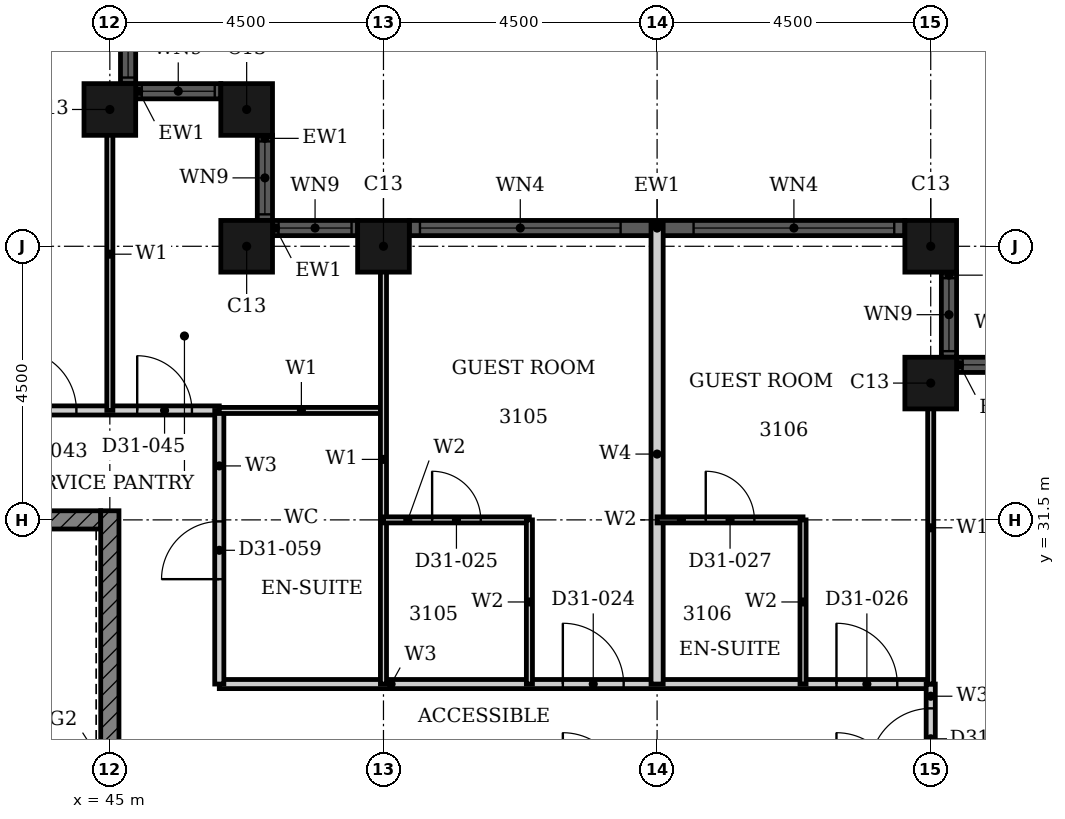
"""IFC4 building model, lengths in metres.
Left out: names, types, materials, properties, quantities, classifications, styles, units other than length and angle.
Written with IfcOpenShell. Run it as: python <this file> out.ifc"""

import sys

from ifc_helpers import new_model, si_unit, direction, frame, frame_2d, origin, origin_2d, place, context, subcontext, project, spatial, rectangle, hollow_rectangle, extrude, element, fill, save


model = new_model("IFC4")
c1 = context("Model", 3, precision=1e-05, world=origin(), true_north=direction((0.0, 1.0)))
c2 = subcontext(c1, "Body", "Model", "MODEL_VIEW")
j1 = project(units=[si_unit("LENGTHUNIT", "METRE"), si_unit("PLANEANGLEUNIT", "RADIAN")], contexts=[c1])
p1 = place(None, origin())
s1 = spatial("IfcSite", under=j1, at=p1, CompositionType="ELEMENT")
p2 = place(p1, origin())
s2 = spatial("IfcBuilding", under=s1, at=p2, CompositionType="ELEMENT")
p3 = place(p2, frame((0.0, 0.0, 126.0)))
s3 = spatial("IfcBuildingStorey", under=s2, at=p3, CompositionType="ELEMENT", Elevation=126.0)
for number, where, z_axis, x_axis in (
    (1, (58.5, 33.75, 0.0), (0.0, 0.0, 1.0), (1.0, 0.0, 0.0)),
    (2, (58.5, 36.0, 0.0), (0.0, 0.0, 1.0), (1.0, 0.0, 0.0)),
    (3, (49.5, 36.0, 0.0), (0.0, 0.0, 1.0), (1.0, 0.0, 0.0)),
    (4, (47.25, 36.0, 0.0), (0.0, 0.0, 1.0), (1.0, 0.0, 0.0)),
    (5, (47.25, 38.25, 0.0), (0.0, 0.0, 1.0), (1.0, 0.0, 0.0)),
    (6, (45.0, 38.25, 0.0), (0.0, 0.0, 1.0), (1.0, 0.0, 0.0)),
):
    element("IfcColumn", number, at=place(p3, frame(where, z_axis=z_axis, x_axis=x_axis)), inside=s3, PredefinedType="COLUMN", context=c2, shape_type="SweptSolid", body=[
        extrude(hollow_rectangle(XDim=0.85, YDim=0.85, WallThickness=0.026, at=origin_2d()), origin(), (0.0, 0.0, 1.0), 3.6),
    ])
p4 = place(p3, frame((60.325, 34.05, 0.0), z_axis=(0.0, 0.0, 1.0), x_axis=(-1.0, 0.0, 0.0)))
e7 = element("IfcWall", 7, at=p4, inside=s3, PredefinedType="SOLIDWALL", context=c2, shape_type="SweptSolid", body=[
    extrude(rectangle(XDim=1.4, YDim=0.25, at=frame_2d((0.7, 0.0))), origin(), (0.0, 0.0, 1.0), 3.6),
])
p5 = place(p4, frame((0.1, 0.0, 0.9)))
e8 = element("IfcOpeningElement", 8, at=p5, cuts=e7, PredefinedType="OPENING", context=c2, shape_type="SweptSolid", body=[
    extrude(rectangle(XDim=1.2, YDim=2.08, at=frame_2d((0.6, 1.04))), frame((0.0, 0.135, 0.0), z_axis=(0.0, -1.0, 0.0), x_axis=(1.0, 0.0, 0.0)), (0.0, 0.0, 1.0), 0.27),
])
p6 = place(p3, frame((58.8, 34.175, 0.0), z_axis=(0.0, 0.0, 1.0), x_axis=(0.0, 1.0, 0.0)))
e9 = element("IfcWall", 9, at=p6, inside=s3, PredefinedType="SOLIDWALL", context=c2, shape_type="SweptSolid", body=[
    extrude(rectangle(XDim=1.4, YDim=0.25, at=frame_2d((0.7, 0.0))), origin(), (0.0, 0.0, 1.0), 3.6),
])
p7 = place(p6, frame((0.1, 0.0, 0.9)))
e10 = element("IfcOpeningElement", 10, at=p7, cuts=e9, PredefinedType="OPENING", context=c2, shape_type="SweptSolid", body=[
    extrude(rectangle(XDim=1.2, YDim=2.08, at=frame_2d((0.6, 1.04))), frame((0.0, 0.135, 0.0), z_axis=(0.0, -1.0, 0.0), x_axis=(1.0, 0.0, 0.0)), (0.0, 0.0, 1.0), 0.27),
])
p8 = place(p3, frame((58.075, 36.3, 0.0), z_axis=(0.0, 0.0, 1.0), x_axis=(-1.0, 0.0, 0.0)))
e11 = element("IfcWall", 11, at=p8, inside=s3, PredefinedType="SOLIDWALL", context=c2, shape_type="SweptSolid", body=[
    extrude(rectangle(XDim=8.15, YDim=0.25, at=frame_2d((4.075, 0.0))), origin(), (0.0, 0.0, 1.0), 3.6),
])
p9 = place(p8, frame((0.175, 0.0, 0.9)))
e12 = element("IfcOpeningElement", 12, at=p9, cuts=e11, PredefinedType="OPENING", context=c2, shape_type="SweptSolid", body=[
    extrude(rectangle(XDim=3.3, YDim=2.08, at=frame_2d((1.65, 1.04))), frame((0.0, 0.135, 0.0), z_axis=(0.0, -1.0, 0.0), x_axis=(1.0, 0.0, 0.0)), (0.0, 0.0, 1.0), 0.27),
])
p10 = place(p8, frame((4.675, 0.0, 0.9)))
e13 = element("IfcOpeningElement", 13, at=p10, cuts=e11, PredefinedType="OPENING", context=c2, shape_type="SweptSolid", body=[
    extrude(rectangle(XDim=3.3, YDim=2.08, at=frame_2d((1.65, 1.04))), frame((0.0, 0.135, 0.0), z_axis=(0.0, -1.0, 0.0), x_axis=(1.0, 0.0, 0.0)), (0.0, 0.0, 1.0), 0.27),
])
p11 = place(p3, frame((49.075, 36.3, 0.0), z_axis=(0.0, 0.0, 1.0), x_axis=(-1.0, 0.0, 0.0)))
e14 = element("IfcWall", 14, at=p11, inside=s3, PredefinedType="SOLIDWALL", context=c2, shape_type="SweptSolid", body=[
    extrude(rectangle(XDim=1.4, YDim=0.25, at=frame_2d((0.7, 0.0))), origin(), (0.0, 0.0, 1.0), 3.6),
])
p12 = place(p11, frame((0.1, 0.0, 0.9)))
e15 = element("IfcOpeningElement", 15, at=p12, cuts=e14, PredefinedType="OPENING", context=c2, shape_type="SweptSolid", body=[
    extrude(rectangle(XDim=1.2, YDim=2.08, at=frame_2d((0.6, 1.04))), frame((0.0, 0.135, 0.0), z_axis=(0.0, -1.0, 0.0), x_axis=(1.0, 0.0, 0.0)), (0.0, 0.0, 1.0), 0.27),
])
p13 = place(p3, frame((47.55, 36.425, 0.0), z_axis=(0.0, 0.0, 1.0), x_axis=(0.0, 1.0, 0.0)))
e16 = element("IfcWall", 16, at=p13, inside=s3, PredefinedType="SOLIDWALL", context=c2, shape_type="SweptSolid", body=[
    extrude(rectangle(XDim=1.4, YDim=0.25, at=frame_2d((0.7, 0.0))), origin(), (0.0, 0.0, 1.0), 3.6),
])
p14 = place(p13, frame((0.1, 0.0, 0.9)))
e17 = element("IfcOpeningElement", 17, at=p14, cuts=e16, PredefinedType="OPENING", context=c2, shape_type="SweptSolid", body=[
    extrude(rectangle(XDim=1.2, YDim=2.08, at=frame_2d((0.6, 1.04))), frame((0.0, 0.135, 0.0), z_axis=(0.0, -1.0, 0.0), x_axis=(1.0, 0.0, 0.0)), (0.0, 0.0, 1.0), 0.27),
])
p15 = place(p3, frame((46.825, 38.55, 0.0), z_axis=(0.0, 0.0, 1.0), x_axis=(-1.0, 0.0, 0.0)))
e18 = element("IfcWall", 18, at=p15, inside=s3, PredefinedType="SOLIDWALL", context=c2, shape_type="SweptSolid", body=[
    extrude(rectangle(XDim=1.4, YDim=0.25, at=frame_2d((0.7, 0.0))), origin(), (0.0, 0.0, 1.0), 3.6),
])
p16 = place(p15, frame((0.1, 0.0, 0.9)))
e19 = element("IfcOpeningElement", 19, at=p16, cuts=e18, PredefinedType="OPENING", context=c2, shape_type="SweptSolid", body=[
    extrude(rectangle(XDim=1.2, YDim=2.08, at=frame_2d((0.6, 1.04))), frame((0.0, 0.135, 0.0), z_axis=(0.0, -1.0, 0.0), x_axis=(1.0, 0.0, 0.0)), (0.0, 0.0, 1.0), 0.27),
])
p17 = place(p3, frame((45.3, 38.675, 0.0), z_axis=(0.0, 0.0, 1.0), x_axis=(0.0, 1.0, 0.0)))
e20 = element("IfcWall", 20, at=p17, inside=s3, PredefinedType="SOLIDWALL", context=c2, shape_type="SweptSolid", body=[
    extrude(rectangle(XDim=1.4, YDim=0.25, at=frame_2d((0.7, 0.0))), origin(), (0.0, 0.0, 1.0), 3.6),
])
p18 = place(p17, frame((0.1, 0.0, 0.9)))
e21 = element("IfcOpeningElement", 21, at=p18, cuts=e20, PredefinedType="OPENING", context=c2, shape_type="SweptSolid", body=[
    extrude(rectangle(XDim=1.2, YDim=2.08, at=frame_2d((0.6, 1.04))), frame((0.0, 0.135, 0.0), z_axis=(0.0, -1.0, 0.0), x_axis=(1.0, 0.0, 0.0)), (0.0, 0.0, 1.0), 0.27),
])
p19 = place(p3, frame((40.625, 31.5, 0.0), z_axis=(0.0, 0.0, 1.0), x_axis=(1.0, 0.0, 0.0)))
e22 = element("IfcWall", 22, at=p19, inside=s3, PredefinedType="SHEAR", context=c2, shape_type="SweptSolid", body=[
    extrude(rectangle(XDim=4.225, YDim=0.3, at=frame_2d((2.113, 0.0))), origin(), (0.0, 0.0, 1.0), 3.3),
])
p20 = place(p3, frame((45.0, 22.35, 0.0), z_axis=(0.0, 0.0, 1.0), x_axis=(0.0, 1.0, 0.0)))
e23 = element("IfcWall", 23, at=p20, inside=s3, PredefinedType="SHEAR", context=c2, shape_type="SweptSolid", body=[
    extrude(rectangle(XDim=9.3, YDim=0.3, at=frame_2d((4.65, 0.0))), origin(), (0.0, 0.0, 1.0), 3.3),
])
p21 = place(p3, frame((46.8, 28.8, 0.0), z_axis=(0.0, 0.0, 1.0), x_axis=(1.0, 0.0, 0.0)))
e24 = element("IfcWall", 24, at=p21, inside=s3, PredefinedType="PARTITIONING", context=c2, shape_type="SweptSolid", body=[
    extrude(rectangle(XDim=11.7, YDim=0.15, at=frame_2d((5.85, 0.0))), origin(), (0.0, 0.0, 1.0), 3.3),
])
p22 = place(p21, frame((5.65, 0.0, 0.0)))
e25 = element("IfcOpeningElement", 25, at=p22, cuts=e24, PredefinedType="OPENING", context=c2, shape_type="SweptSolid", body=[
    extrude(rectangle(XDim=1.0, YDim=2.1, at=frame_2d((0.5, 1.05))), frame((0.0, 0.085, 0.0), z_axis=(0.0, -1.0, 0.0), x_axis=(1.0, 0.0, 0.0)), (0.0, 0.0, 1.0), 0.17),
])
p23 = place(p21, frame((10.15, 0.0, 0.0)))
e26 = element("IfcOpeningElement", 26, at=p23, cuts=e24, PredefinedType="OPENING", context=c2, shape_type="SweptSolid", body=[
    extrude(rectangle(XDim=1.0, YDim=2.1, at=frame_2d((0.5, 1.05))), frame((0.0, 0.085, 0.0), z_axis=(0.0, -1.0, 0.0), x_axis=(1.0, 0.0, 0.0)), (0.0, 0.0, 1.0), 0.17),
])
p24 = place(p3, frame((40.5, 33.3, 0.0), z_axis=(0.0, 0.0, 1.0), x_axis=(1.0, 0.0, 0.0)))
e27 = element("IfcWall", 27, at=p24, inside=s3, PredefinedType="PARTITIONING", context=c2, shape_type="SweptSolid", body=[
    extrude(rectangle(XDim=6.3, YDim=0.15, at=frame_2d((3.15, 0.0))), origin(), (0.0, 0.0, 1.0), 3.3),
])
p25 = place(p24, frame((2.95, 0.0, 0.0)))
e28 = element("IfcOpeningElement", 28, at=p25, cuts=e27, PredefinedType="OPENING", context=c2, shape_type="SweptSolid", body=[
    extrude(rectangle(XDim=1.0, YDim=2.1, at=frame_2d((0.5, 1.05))), frame((0.0, 0.085, 0.0), z_axis=(0.0, -1.0, 0.0), x_axis=(1.0, 0.0, 0.0)), (0.0, 0.0, 1.0), 0.17),
])
p26 = place(p24, frame((4.95, 0.0, 0.0)))
e29 = element("IfcOpeningElement", 29, at=p26, cuts=e27, PredefinedType="OPENING", context=c2, shape_type="SweptSolid", body=[
    extrude(rectangle(XDim=0.9, YDim=2.1, at=frame_2d((0.45, 1.05))), frame((0.0, 0.085, 0.0), z_axis=(0.0, -1.0, 0.0), x_axis=(1.0, 0.0, 0.0)), (0.0, 0.0, 1.0), 0.17),
])
p27 = place(p3, frame((46.8, 28.8, 0.0), z_axis=(0.0, 0.0, 1.0), x_axis=(0.0, 1.0, 0.0)))
e30 = element("IfcWall", 30, at=p27, inside=s3, PredefinedType="PARTITIONING", context=c2, shape_type="SweptSolid", body=[
    extrude(rectangle(XDim=4.5, YDim=0.15, at=frame_2d((2.25, 0.0))), origin(), (0.0, 0.0, 1.0), 3.3),
])
p28 = place(p27, frame((1.725, 0.0, 0.0)))
e31 = element("IfcOpeningElement", 31, at=p28, cuts=e30, PredefinedType="OPENING", context=c2, shape_type="SweptSolid", body=[
    extrude(rectangle(XDim=0.95, YDim=2.1, at=frame_2d((0.475, 1.05))), frame((0.0, 0.085, 0.0), z_axis=(0.0, -1.0, 0.0), x_axis=(1.0, 0.0, 0.0)), (0.0, 0.0, 1.0), 0.17),
])
p29 = place(p3, frame((58.5, 27.0, 0.0), z_axis=(0.0, 0.0, 1.0), x_axis=(0.0, 1.0, 0.0)))
e32 = element("IfcWall", 32, at=p29, inside=s3, PredefinedType="PARTITIONING", context=c2, shape_type="SweptSolid", body=[
    extrude(rectangle(XDim=1.8, YDim=0.15, at=frame_2d((0.9, 0.0))), origin(), (0.0, 0.0, 1.0), 3.3),
])
p30 = place(p29, frame((0.4, 0.0, 0.0)))
e33 = element("IfcOpeningElement", 33, at=p30, cuts=e32, PredefinedType="OPENING", context=c2, shape_type="SweptSolid", body=[
    extrude(rectangle(XDim=1.0, YDim=2.1, at=frame_2d((0.5, 1.05))), frame((0.0, 0.085, 0.0), z_axis=(0.0, -1.0, 0.0), x_axis=(1.0, 0.0, 0.0)), (0.0, 0.0, 1.0), 0.17),
])
p31 = place(p3, frame((46.8, 33.3, 0.0), z_axis=(0.0, 0.0, 1.0), x_axis=(1.0, 0.0, 0.0)))
e34 = element("IfcWall", 34, at=p31, inside=s3, PredefinedType="PARTITIONING", context=c2, shape_type="SweptSolid", body=[
    extrude(rectangle(XDim=2.7, YDim=0.1, at=frame_2d((1.35, 0.0))), origin(), (0.0, 0.0, 1.0), 3.3),
])
p32 = place(p3, frame((45.0, 33.3, 0.0), z_axis=(0.0, 0.0, 1.0), x_axis=(0.0, 1.0, 0.0)))
e35 = element("IfcWall", 35, at=p32, inside=s3, PredefinedType="PARTITIONING", context=c2, shape_type="SweptSolid", body=[
    extrude(rectangle(XDim=5.14, YDim=0.1, at=frame_2d((2.57, 0.0))), origin(), (0.0, 0.0, 1.0), 3.3),
])
p33 = place(p3, frame((49.5, 28.8, 0.0), z_axis=(0.0, 0.0, 1.0), x_axis=(0.0, 1.0, 0.0)))
e36 = element("IfcWall", 36, at=p33, inside=s3, PredefinedType="PARTITIONING", context=c2, shape_type="SweptSolid", body=[
    extrude(rectangle(XDim=7.39, YDim=0.1, at=frame_2d((3.695, 0.0))), origin(), (0.0, 0.0, 1.0), 2.38),
])
p34 = place(p3, frame((58.5, 28.8, 0.0), z_axis=(0.0, 0.0, 1.0), x_axis=(0.0, 1.0, 0.0)))
e37 = element("IfcWall", 37, at=p34, inside=s3, PredefinedType="PARTITIONING", context=c2, shape_type="SweptSolid", body=[
    extrude(rectangle(XDim=5.14, YDim=0.1, at=frame_2d((2.57, 0.0))), origin(), (0.0, 0.0, 1.0), 3.3),
])
p35 = place(p3, frame((54.0, 28.8, 0.0), z_axis=(0.0, 0.0, 1.0), x_axis=(0.0, 1.0, 0.0)))
e38 = element("IfcWall", 38, at=p35, inside=s3, PredefinedType="PARTITIONING", context=c2, shape_type="SweptSolid", body=[
    extrude(rectangle(XDim=7.565, YDim=0.2, at=frame_2d((3.782, 0.0))), origin(), (0.0, 0.0, 1.0), 3.3),
])
p36 = place(p3, frame((49.5, 31.5, 0.0), z_axis=(0.0, 0.0, 1.0), x_axis=(1.0, 0.0, 0.0)))
e39 = element("IfcWall", 39, at=p36, inside=s3, PredefinedType="PARTITIONING", context=c2, shape_type="SweptSolid", body=[
    extrude(rectangle(XDim=2.4, YDim=0.1, at=frame_2d((1.2, 0.0))), origin(), (0.0, 0.0, 1.0), 2.58),
])
p37 = place(p36, frame((0.8, 0.0, 0.0)))
e40 = element("IfcOpeningElement", 40, at=p37, cuts=e39, PredefinedType="OPENING", context=c2, shape_type="SweptSolid", body=[
    extrude(rectangle(XDim=0.8, YDim=2.1, at=frame_2d((0.4, 1.05))), frame((0.0, 0.06, 0.0), z_axis=(0.0, -1.0, 0.0), x_axis=(1.0, 0.0, 0.0)), (0.0, 0.0, 1.0), 0.12),
])
p38 = place(p3, frame((54.0, 31.5, 0.0), z_axis=(0.0, 0.0, 1.0), x_axis=(1.0, 0.0, 0.0)))
e41 = element("IfcWall", 41, at=p38, inside=s3, PredefinedType="PARTITIONING", context=c2, shape_type="SweptSolid", body=[
    extrude(rectangle(XDim=2.4, YDim=0.1, at=frame_2d((1.2, 0.0))), origin(), (0.0, 0.0, 1.0), 2.58),
])
p39 = place(p38, frame((0.8, 0.0, 0.0)))
e42 = element("IfcOpeningElement", 42, at=p39, cuts=e41, PredefinedType="OPENING", context=c2, shape_type="SweptSolid", body=[
    extrude(rectangle(XDim=0.8, YDim=2.1, at=frame_2d((0.4, 1.05))), frame((0.0, 0.06, 0.0), z_axis=(0.0, -1.0, 0.0), x_axis=(1.0, 0.0, 0.0)), (0.0, 0.0, 1.0), 0.12),
])
for number, where, z_axis, x_axis in (
    (43, (51.9, 28.8, 0.0), (0.0, 0.0, 1.0), (0.0, 1.0, 0.0)),
    (44, (56.4, 28.8, 0.0), (0.0, 0.0, 1.0), (0.0, 1.0, 0.0)),
):
    element("IfcWall", number, at=place(p3, frame(where, z_axis=z_axis, x_axis=x_axis)), inside=s3, PredefinedType="PARTITIONING", context=c2, shape_type="SweptSolid", body=[
        extrude(rectangle(XDim=2.7, YDim=0.1, at=frame_2d((1.35, 0.0))), origin(), (0.0, 0.0, 1.0), 3.3),
    ])
p40 = place(p5, origin())
e45 = element("IfcWindow", 45, at=p40, inside=s3, PartitioningType="SINGLE_PANEL", PredefinedType="WINDOW", context=c2, shape_type="SweptSolid", body=[
    extrude(rectangle(XDim=1.2, YDim=2.08, at=frame_2d((0.6, 1.04))), frame((0.0, 0.03, 0.0), z_axis=(0.0, -1.0, 0.0), x_axis=(1.0, 0.0, 0.0)), (0.0, 0.0, 1.0), 0.06),
])
fill(e8, e45)
p41 = place(p7, origin())
e46 = element("IfcWindow", 46, at=p41, inside=s3, PartitioningType="SINGLE_PANEL", PredefinedType="WINDOW", context=c2, shape_type="SweptSolid", body=[
    extrude(rectangle(XDim=1.2, YDim=2.08, at=frame_2d((0.6, 1.04))), frame((0.0, 0.03, 0.0), z_axis=(0.0, -1.0, 0.0), x_axis=(1.0, 0.0, 0.0)), (0.0, 0.0, 1.0), 0.06),
])
fill(e10, e46)
p42 = place(p9, origin())
e47 = element("IfcWindow", 47, at=p42, inside=s3, PartitioningType="SINGLE_PANEL", PredefinedType="WINDOW", context=c2, shape_type="SweptSolid", body=[
    extrude(rectangle(XDim=3.3, YDim=2.08, at=frame_2d((1.65, 1.04))), frame((0.0, 0.03, 0.0), z_axis=(0.0, -1.0, 0.0), x_axis=(1.0, 0.0, 0.0)), (0.0, 0.0, 1.0), 0.06),
])
fill(e12, e47)
p43 = place(p10, origin())
e48 = element("IfcWindow", 48, at=p43, inside=s3, PartitioningType="SINGLE_PANEL", PredefinedType="WINDOW", context=c2, shape_type="SweptSolid", body=[
    extrude(rectangle(XDim=3.3, YDim=2.08, at=frame_2d((1.65, 1.04))), frame((0.0, 0.03, 0.0), z_axis=(0.0, -1.0, 0.0), x_axis=(1.0, 0.0, 0.0)), (0.0, 0.0, 1.0), 0.06),
])
fill(e13, e48)
p44 = place(p12, origin())
e49 = element("IfcWindow", 49, at=p44, inside=s3, PartitioningType="SINGLE_PANEL", PredefinedType="WINDOW", context=c2, shape_type="SweptSolid", body=[
    extrude(rectangle(XDim=1.2, YDim=2.08, at=frame_2d((0.6, 1.04))), frame((0.0, 0.03, 0.0), z_axis=(0.0, -1.0, 0.0), x_axis=(1.0, 0.0, 0.0)), (0.0, 0.0, 1.0), 0.06),
])
fill(e15, e49)
p45 = place(p14, origin())
e50 = element("IfcWindow", 50, at=p45, inside=s3, PartitioningType="SINGLE_PANEL", PredefinedType="WINDOW", context=c2, shape_type="SweptSolid", body=[
    extrude(rectangle(XDim=1.2, YDim=2.08, at=frame_2d((0.6, 1.04))), frame((0.0, 0.03, 0.0), z_axis=(0.0, -1.0, 0.0), x_axis=(1.0, 0.0, 0.0)), (0.0, 0.0, 1.0), 0.06),
])
fill(e17, e50)
p46 = place(p16, origin())
e51 = element("IfcWindow", 51, at=p46, inside=s3, PartitioningType="SINGLE_PANEL", PredefinedType="WINDOW", context=c2, shape_type="SweptSolid", body=[
    extrude(rectangle(XDim=1.2, YDim=2.08, at=frame_2d((0.6, 1.04))), frame((0.0, 0.03, 0.0), z_axis=(0.0, -1.0, 0.0), x_axis=(1.0, 0.0, 0.0)), (0.0, 0.0, 1.0), 0.06),
])
fill(e19, e51)
p47 = place(p18, origin())
e52 = element("IfcWindow", 52, at=p47, inside=s3, PartitioningType="SINGLE_PANEL", PredefinedType="WINDOW", context=c2, shape_type="SweptSolid", body=[
    extrude(rectangle(XDim=1.2, YDim=2.08, at=frame_2d((0.6, 1.04))), frame((0.0, 0.03, 0.0), z_axis=(0.0, -1.0, 0.0), x_axis=(1.0, 0.0, 0.0)), (0.0, 0.0, 1.0), 0.06),
])
fill(e21, e52)
p48 = place(p22, origin())
e53 = element("IfcDoor", 53, at=p48, inside=s3, OperationType="SINGLE_SWING_RIGHT", PredefinedType="DOOR", context=c2, shape_type="SweptSolid", body=[
    extrude(rectangle(XDim=1.0, YDim=2.1, at=frame_2d((0.5, 1.05))), frame((0.0, 0.025, 0.0), z_axis=(0.0, -1.0, 0.0), x_axis=(1.0, 0.0, 0.0)), (0.0, 0.0, 1.0), 0.05),
])
fill(e25, e53)
p49 = place(p37, origin())
e54 = element("IfcDoor", 54, at=p49, inside=s3, OperationType="SINGLE_SWING_RIGHT", PredefinedType="DOOR", context=c2, shape_type="SweptSolid", body=[
    extrude(rectangle(XDim=0.8, YDim=2.1, at=frame_2d((0.4, 1.05))), frame((0.0, 0.025, 0.0), z_axis=(0.0, -1.0, 0.0), x_axis=(1.0, 0.0, 0.0)), (0.0, 0.0, 1.0), 0.05),
])
fill(e40, e54)
p50 = place(p23, origin())
e55 = element("IfcDoor", 55, at=p50, inside=s3, OperationType="SINGLE_SWING_RIGHT", PredefinedType="DOOR", context=c2, shape_type="SweptSolid", body=[
    extrude(rectangle(XDim=1.0, YDim=2.1, at=frame_2d((0.5, 1.05))), frame((0.0, 0.025, 0.0), z_axis=(0.0, -1.0, 0.0), x_axis=(1.0, 0.0, 0.0)), (0.0, 0.0, 1.0), 0.05),
])
fill(e26, e55)
p51 = place(p39, origin())
e56 = element("IfcDoor", 56, at=p51, inside=s3, OperationType="SINGLE_SWING_LEFT", PredefinedType="DOOR", context=c2, shape_type="SweptSolid", body=[
    extrude(rectangle(XDim=0.8, YDim=2.1, at=frame_2d((0.4, 1.05))), frame((0.0, 0.025, 0.0), z_axis=(0.0, -1.0, 0.0), x_axis=(1.0, 0.0, 0.0)), (0.0, 0.0, 1.0), 0.05),
])
fill(e42, e56)
p52 = place(p30, origin())
e57 = element("IfcDoor", 57, at=p52, inside=s3, OperationType="SINGLE_SWING_RIGHT", PredefinedType="DOOR", context=c2, shape_type="SweptSolid", body=[
    extrude(rectangle(XDim=1.0, YDim=2.1, at=frame_2d((0.5, 1.05))), frame((0.0, 0.025, 0.0), z_axis=(0.0, -1.0, 0.0), x_axis=(1.0, 0.0, 0.0)), (0.0, 0.0, 1.0), 0.05),
])
fill(e33, e57)
p53 = place(p25, origin())
e58 = element("IfcDoor", 58, at=p53, inside=s3, OperationType="SINGLE_SWING_RIGHT", PredefinedType="DOOR", context=c2, shape_type="SweptSolid", body=[
    extrude(rectangle(XDim=1.0, YDim=2.1, at=frame_2d((0.5, 1.05))), frame((0.0, 0.025, 0.0), z_axis=(0.0, -1.0, 0.0), x_axis=(1.0, 0.0, 0.0)), (0.0, 0.0, 1.0), 0.05),
])
fill(e28, e58)
p54 = place(p26, origin())
e59 = element("IfcDoor", 59, at=p54, inside=s3, OperationType="SINGLE_SWING_LEFT", PredefinedType="DOOR", context=c2, shape_type="SweptSolid", body=[
    extrude(rectangle(XDim=0.9, YDim=2.1, at=frame_2d((0.45, 1.05))), frame((0.0, 0.025, 0.0), z_axis=(0.0, -1.0, 0.0), x_axis=(1.0, 0.0, 0.0)), (0.0, 0.0, 1.0), 0.05),
])
fill(e29, e59)
p55 = place(p28, origin())
e60 = element("IfcDoor", 60, at=p55, inside=s3, OperationType="SINGLE_SWING_RIGHT", PredefinedType="DOOR", context=c2, shape_type="SweptSolid", body=[
    extrude(rectangle(XDim=0.95, YDim=2.1, at=frame_2d((0.475, 1.05))), frame((0.0, 0.025, 0.0), z_axis=(0.0, -1.0, 0.0), x_axis=(1.0, 0.0, 0.0)), (0.0, 0.0, 1.0), 0.05),
])
fill(e31, e60)
save(model, sys.argv[1])
